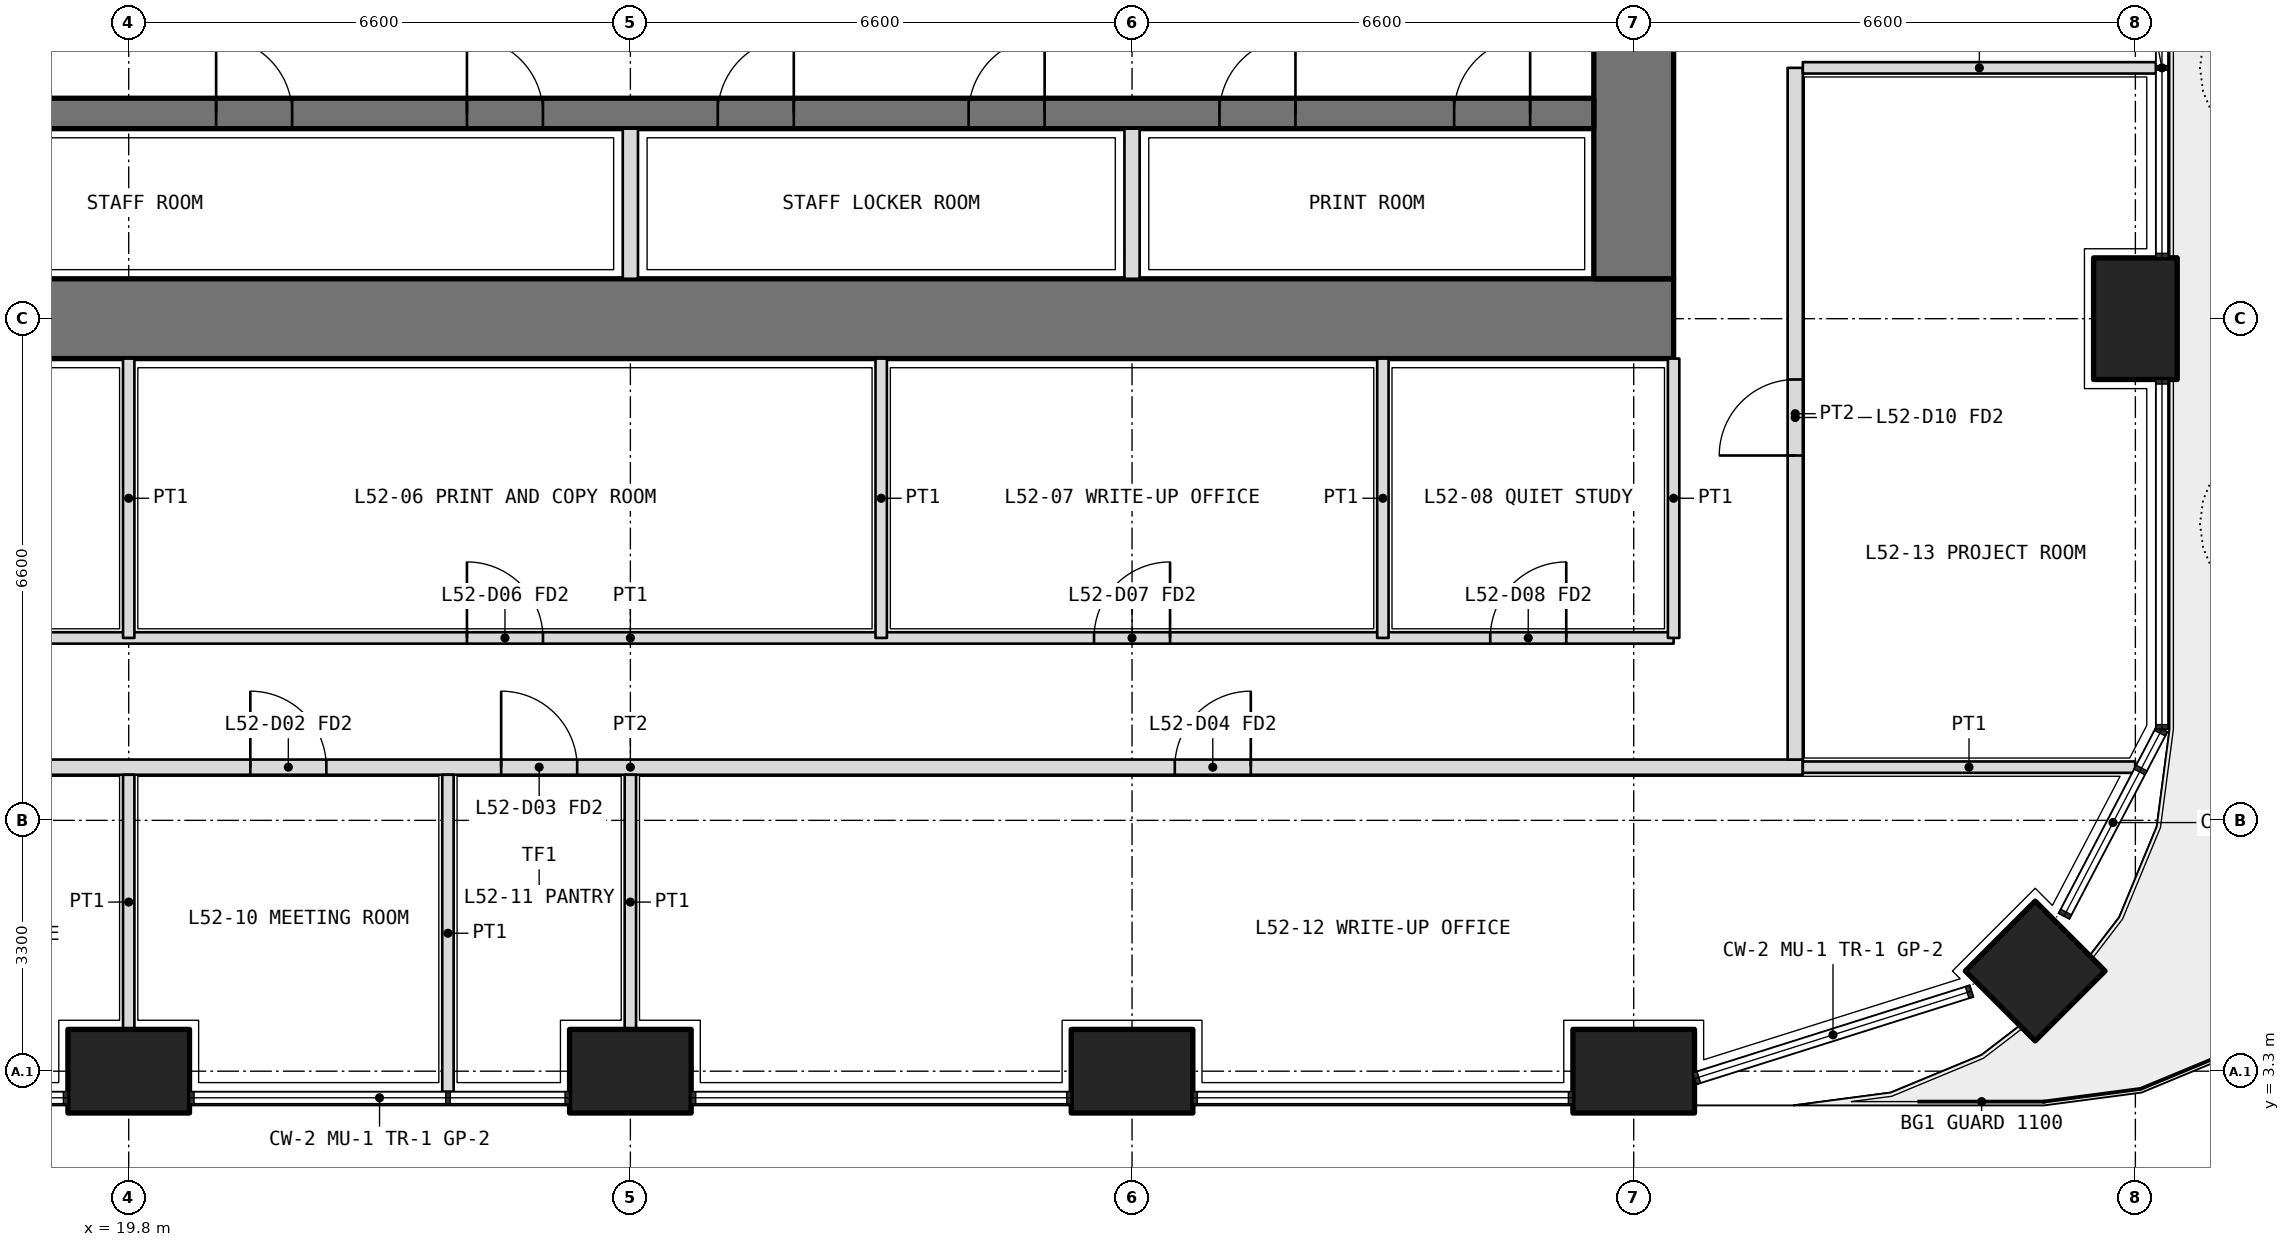
"""IFC4 building model, lengths in metres.
Left out: names, types, materials, properties, quantities, classifications, styles, units other than length and angle.
Written with IfcOpenShell. Run it as: python <this file> out.ifc"""

import sys

from ifc_helpers import new_model, si_unit, direction, frame, frame_2d, origin, origin_2d, place, context, subcontext, project, spatial, rectangle, extrude, element, fill, save


model = new_model("IFC4")
c1 = context("Model", 3, precision=1e-05, world=origin(), true_north=direction((0.0, 1.0)))
c2 = subcontext(c1, "Body", "Model", "MODEL_VIEW")
j1 = project(units=[si_unit("LENGTHUNIT", "METRE"), si_unit("PLANEANGLEUNIT", "RADIAN")], contexts=[c1])
p1 = place(None, origin())
s1 = spatial("IfcSite", under=j1, at=p1, CompositionType="ELEMENT")
p2 = place(p1, origin())
s2 = spatial("IfcBuilding", under=s1, at=p2, CompositionType="ELEMENT")
p3 = place(p2, frame((0.0, 0.0, 229.2)))
s3 = spatial("IfcBuildingStorey", under=s2, at=p3, CompositionType="ELEMENT", Elevation=229.2)
p4 = place(p3, frame((44.882, 4.618, 0.0), z_axis=(0.0, 0.0, 1.0), x_axis=(0.707106781187, 0.707106781187, 0.0)))
e1 = element("IfcColumn", 1, at=p4, inside=s3, PredefinedType="COLUMN", context=c2, shape_type="SweptSolid", body=[
    extrude(rectangle(XDim=1.3, YDim=1.3, at=origin_2d()), origin(), (0.0, 0.0, 1.0), 4.2),
])
for number, where, z_axis, x_axis in (
    (2, (19.8, 3.3, 0.0), (0.0, 0.0, 1.0), (1.0, 0.0, 0.0)),
    (3, (26.4, 3.3, 0.0), (0.0, 0.0, 1.0), (1.0, 0.0, 0.0)),
    (4, (33.0, 3.3, 0.0), (0.0, 0.0, 1.0), (1.0, 0.0, 0.0)),
    (5, (39.6, 3.3, 0.0), (0.0, 0.0, 1.0), (1.0, 0.0, 0.0)),
    (6, (46.2, 13.2, 0.0), (0.0, 0.0, 1.0), (0.0, 1.0, 0.0)),
):
    element("IfcColumn", number, at=place(p3, frame(where, z_axis=z_axis, x_axis=x_axis)), inside=s3, PredefinedType="COLUMN", context=c2, shape_type="SweptSolid", body=[
        extrude(rectangle(XDim=1.6, YDim=1.1, at=origin_2d()), origin(), (0.0, 0.0, 1.0), 4.2),
    ])
p5 = place(p3, frame((12.675, 13.2, 0.0), z_axis=(0.0, 0.0, 1.0), x_axis=(1.0, 0.0, 0.0)))
e7 = element("IfcWall", 7, at=p5, inside=s3, PredefinedType="SHEAR", context=c2, shape_type="SweptSolid", body=[
    extrude(rectangle(XDim=27.45, YDim=1.05, at=frame_2d((13.725, 0.0))), origin(), (0.0, 0.0, 1.0), 4.2),
])
p6 = place(p3, frame((39.6, 13.725, 0.0), z_axis=(0.0, 0.0, 1.0), x_axis=(0.0, 1.0, 0.0)))
e8 = element("IfcWall", 8, at=p6, inside=s3, PredefinedType="SHEAR", context=c2, shape_type="SweptSolid", body=[
    extrude(rectangle(XDim=18.75, YDim=1.05, at=frame_2d((9.375, 0.0))), origin(), (0.0, 0.0, 1.0), 4.2),
])
p7 = place(p6, frame((3.025, 0.0, 0.0)))
e9 = element("IfcOpeningElement", 9, at=p7, cuts=e8, PredefinedType="OPENING", context=c2, shape_type="SweptSolid", body=[
    extrude(rectangle(XDim=1.6, YDim=2.1, at=frame_2d((0.8, 1.05))), frame((0.0, 0.535, 0.0), z_axis=(0.0, -1.0, 0.0), x_axis=(1.0, 0.0, 0.0)), (0.0, 0.0, 1.0), 1.07),
])
p8 = place(p6, frame((13.825, 0.0, 0.0)))
e10 = element("IfcOpeningElement", 10, at=p8, cuts=e8, PredefinedType="OPENING", context=c2, shape_type="SweptSolid", body=[
    extrude(rectangle(XDim=1.6, YDim=2.1, at=frame_2d((0.8, 1.05))), frame((0.0, 0.535, 0.0), z_axis=(0.0, -1.0, 0.0), x_axis=(1.0, 0.0, 0.0)), (0.0, 0.0, 1.0), 1.07),
])
p9 = place(p3, frame((13.725, 15.9, 0.0), z_axis=(0.0, 0.0, 1.0), x_axis=(1.0, 0.0, 0.0)))
e11 = element("IfcWall", 11, at=p9, inside=s3, PredefinedType="SHEAR", context=c2, shape_type="SweptSolid", body=[
    extrude(rectangle(XDim=25.35, YDim=0.4, at=frame_2d((12.675, 0.0))), origin(), (0.0, 0.0, 1.0), 4.2),
])
p10 = place(p9, frame((0.837, 0.0, 0.0)))
e12 = element("IfcOpeningElement", 12, at=p10, cuts=e11, PredefinedType="OPENING", context=c2, shape_type="SweptSolid", body=[
    extrude(rectangle(XDim=1.0, YDim=2.1, at=frame_2d((0.5, 1.05))), frame((0.0, 0.21, 0.0), z_axis=(0.0, -1.0, 0.0), x_axis=(1.0, 0.0, 0.0)), (0.0, 0.0, 1.0), 0.42),
])
p11 = place(p9, frame((3.925, 0.0, 0.0)))
e13 = element("IfcOpeningElement", 13, at=p11, cuts=e11, PredefinedType="OPENING", context=c2, shape_type="SweptSolid", body=[
    extrude(rectangle(XDim=1.0, YDim=2.1, at=frame_2d((0.5, 1.05))), frame((0.0, 0.21, 0.0), z_axis=(0.0, -1.0, 0.0), x_axis=(1.0, 0.0, 0.0)), (0.0, 0.0, 1.0), 0.42),
])
p12 = place(p9, frame((7.225, 0.0, 0.0)))
e14 = element("IfcOpeningElement", 14, at=p12, cuts=e11, PredefinedType="OPENING", context=c2, shape_type="SweptSolid", body=[
    extrude(rectangle(XDim=1.0, YDim=2.1, at=frame_2d((0.5, 1.05))), frame((0.0, 0.21, 0.0), z_axis=(0.0, -1.0, 0.0), x_axis=(1.0, 0.0, 0.0)), (0.0, 0.0, 1.0), 0.42),
])
p13 = place(p9, frame((10.525, 0.0, 0.0)))
e15 = element("IfcOpeningElement", 15, at=p13, cuts=e11, PredefinedType="OPENING", context=c2, shape_type="SweptSolid", body=[
    extrude(rectangle(XDim=1.0, YDim=2.1, at=frame_2d((0.5, 1.05))), frame((0.0, 0.21, 0.0), z_axis=(0.0, -1.0, 0.0), x_axis=(1.0, 0.0, 0.0)), (0.0, 0.0, 1.0), 0.42),
])
p14 = place(p9, frame((13.825, 0.0, 0.0)))
e16 = element("IfcOpeningElement", 16, at=p14, cuts=e11, PredefinedType="OPENING", context=c2, shape_type="SweptSolid", body=[
    extrude(rectangle(XDim=1.0, YDim=2.1, at=frame_2d((0.5, 1.05))), frame((0.0, 0.21, 0.0), z_axis=(0.0, -1.0, 0.0), x_axis=(1.0, 0.0, 0.0)), (0.0, 0.0, 1.0), 0.42),
])
p15 = place(p9, frame((17.125, 0.0, 0.0)))
e17 = element("IfcOpeningElement", 17, at=p15, cuts=e11, PredefinedType="OPENING", context=c2, shape_type="SweptSolid", body=[
    extrude(rectangle(XDim=1.0, YDim=2.1, at=frame_2d((0.5, 1.05))), frame((0.0, 0.21, 0.0), z_axis=(0.0, -1.0, 0.0), x_axis=(1.0, 0.0, 0.0)), (0.0, 0.0, 1.0), 0.42),
])
p16 = place(p9, frame((20.425, 0.0, 0.0)))
e18 = element("IfcOpeningElement", 18, at=p16, cuts=e11, PredefinedType="OPENING", context=c2, shape_type="SweptSolid", body=[
    extrude(rectangle(XDim=1.0, YDim=2.1, at=frame_2d((0.5, 1.05))), frame((0.0, 0.21, 0.0), z_axis=(0.0, -1.0, 0.0), x_axis=(1.0, 0.0, 0.0)), (0.0, 0.0, 1.0), 0.42),
])
p17 = place(p9, frame((23.512, 0.0, 0.0)))
e19 = element("IfcOpeningElement", 19, at=p17, cuts=e11, PredefinedType="OPENING", context=c2, shape_type="SweptSolid", body=[
    extrude(rectangle(XDim=1.0, YDim=2.1, at=frame_2d((0.5, 1.05))), frame((0.0, 0.21, 0.0), z_axis=(0.0, -1.0, 0.0), x_axis=(1.0, 0.0, 0.0)), (0.0, 0.0, 1.0), 0.42),
])
for number, where, z_axis, x_axis in (
    (20, (26.4, 13.725, 0.0), (0.0, 0.0, 1.0), (0.0, 1.0, 0.0)),
    (21, (33.0, 13.725, 0.0), (0.0, 0.0, 1.0), (0.0, 1.0, 0.0)),
):
    element("IfcWall", number, at=place(p3, frame(where, z_axis=z_axis, x_axis=x_axis)), inside=s3, PredefinedType="PARTITIONING", context=c2, shape_type="SweptSolid", body=[
        extrude(rectangle(XDim=1.975, YDim=0.2, at=frame_2d((0.987, 0.0))), origin(), (0.0, 0.0, 1.0), 4.2),
    ])
p18 = place(p3, frame((12.675, 9.0, 0.0), z_axis=(0.0, 0.0, 1.0), x_axis=(1.0, 0.0, 0.0)))
e22 = element("IfcWall", 22, at=p18, inside=s3, PredefinedType="PARTITIONING", context=c2, shape_type="SweptSolid", body=[
    extrude(rectangle(XDim=27.45, YDim=0.15, at=frame_2d((13.725, 0.0))), origin(), (0.0, 0.0, 1.0), 3.0),
])
p19 = place(p18, frame((3.062, 0.0, 0.0)))
e23 = element("IfcOpeningElement", 23, at=p19, cuts=e22, PredefinedType="OPENING", context=c2, shape_type="SweptSolid", body=[
    extrude(rectangle(XDim=1.0, YDim=2.1, at=frame_2d((0.5, 1.05))), frame((0.0, 0.085, 0.0), z_axis=(0.0, -1.0, 0.0), x_axis=(1.0, 0.0, 0.0)), (0.0, 0.0, 1.0), 0.17),
])
p20 = place(p18, frame((11.575, 0.0, 0.0)))
e24 = element("IfcOpeningElement", 24, at=p20, cuts=e22, PredefinedType="OPENING", context=c2, shape_type="SweptSolid", body=[
    extrude(rectangle(XDim=1.0, YDim=2.1, at=frame_2d((0.5, 1.05))), frame((0.0, 0.085, 0.0), z_axis=(0.0, -1.0, 0.0), x_axis=(1.0, 0.0, 0.0)), (0.0, 0.0, 1.0), 0.17),
])
p21 = place(p18, frame((19.825, 0.0, 0.0)))
e25 = element("IfcOpeningElement", 25, at=p21, cuts=e22, PredefinedType="OPENING", context=c2, shape_type="SweptSolid", body=[
    extrude(rectangle(XDim=1.0, YDim=2.1, at=frame_2d((0.5, 1.05))), frame((0.0, 0.085, 0.0), z_axis=(0.0, -1.0, 0.0), x_axis=(1.0, 0.0, 0.0)), (0.0, 0.0, 1.0), 0.17),
])
p22 = place(p18, frame((25.038, 0.0, 0.0)))
e26 = element("IfcOpeningElement", 26, at=p22, cuts=e22, PredefinedType="OPENING", context=c2, shape_type="SweptSolid", body=[
    extrude(rectangle(XDim=1.0, YDim=2.1, at=frame_2d((0.5, 1.05))), frame((0.0, 0.085, 0.0), z_axis=(0.0, -1.0, 0.0), x_axis=(1.0, 0.0, 0.0)), (0.0, 0.0, 1.0), 0.17),
])
for number, where, z_axis, x_axis in (
    (27, (40.125, 12.675, 0.0), (0.0, 0.0, 1.0), (0.0, -1.0, 0.0)),
    (28, (19.8, 12.675, 0.0), (0.0, 0.0, 1.0), (0.0, -1.0, 0.0)),
):
    element("IfcWall", number, at=place(p3, frame(where, z_axis=z_axis, x_axis=x_axis)), inside=s3, PredefinedType="PARTITIONING", context=c2, shape_type="SweptSolid", body=[
        extrude(rectangle(XDim=3.675, YDim=0.15, at=frame_2d((1.837, 0.0))), origin(), (0.0, 0.0, 1.0), 3.0),
    ])
for number, where, z_axis, x_axis in (
    (29, (29.7, 12.675, 0.0), (0.0, 0.0, 1.0), (0.0, -1.0, 0.0)),
    (30, (36.3, 12.675, 0.0), (0.0, 0.0, 1.0), (0.0, -1.0, 0.0)),
):
    element("IfcWall", number, at=place(p3, frame(where, z_axis=z_axis, x_axis=x_axis)), inside=s3, PredefinedType="PARTITIONING", context=c2, shape_type="SweptSolid", body=[
        extrude(rectangle(XDim=3.675, YDim=0.15, at=frame_2d((1.837, 0.0))), origin(), (0.0, 0.0, 1.0), 3.9),
    ])
p23 = place(p3, frame((10.975, 7.3, 0.0), z_axis=(0.0, 0.0, 1.0), x_axis=(1.0, 0.0, 0.0)))
e31 = element("IfcWall", 31, at=p23, inside=s3, PredefinedType="PARTITIONING", context=c2, shape_type="SweptSolid", body=[
    extrude(rectangle(XDim=30.85, YDim=0.2, at=frame_2d((15.425, 0.0))), origin(), (0.0, 0.0, 1.0), 3.0),
])
p24 = place(p23, frame((3.962, 0.0, 0.0)))
e32 = element("IfcOpeningElement", 32, at=p24, cuts=e31, PredefinedType="OPENING", context=c2, shape_type="SweptSolid", body=[
    extrude(rectangle(XDim=1.0, YDim=2.1, at=frame_2d((0.5, 1.05))), frame((0.0, 0.11, 0.0), z_axis=(0.0, -1.0, 0.0), x_axis=(1.0, 0.0, 0.0)), (0.0, 0.0, 1.0), 0.22),
])
p25 = place(p23, frame((10.425, 0.0, 0.0)))
e33 = element("IfcOpeningElement", 33, at=p25, cuts=e31, PredefinedType="OPENING", context=c2, shape_type="SweptSolid", body=[
    extrude(rectangle(XDim=1.0, YDim=2.1, at=frame_2d((0.5, 1.05))), frame((0.0, 0.11, 0.0), z_axis=(0.0, -1.0, 0.0), x_axis=(1.0, 0.0, 0.0)), (0.0, 0.0, 1.0), 0.22),
])
p26 = place(p23, frame((13.725, 0.0, 0.0)))
e34 = element("IfcOpeningElement", 34, at=p26, cuts=e31, PredefinedType="OPENING", context=c2, shape_type="SweptSolid", body=[
    extrude(rectangle(XDim=1.0, YDim=2.1, at=frame_2d((0.5, 1.05))), frame((0.0, 0.11, 0.0), z_axis=(0.0, -1.0, 0.0), x_axis=(1.0, 0.0, 0.0)), (0.0, 0.0, 1.0), 0.22),
])
p27 = place(p23, frame((22.587, 0.0, 0.0)))
e35 = element("IfcOpeningElement", 35, at=p27, cuts=e31, PredefinedType="OPENING", context=c2, shape_type="SweptSolid", body=[
    extrude(rectangle(XDim=1.0, YDim=2.1, at=frame_2d((0.5, 1.05))), frame((0.0, 0.11, 0.0), z_axis=(0.0, -1.0, 0.0), x_axis=(1.0, 0.0, 0.0)), (0.0, 0.0, 1.0), 0.22),
])
p28 = place(p3, frame((41.725, 7.4, 0.0), z_axis=(0.0, 0.0, 1.0), x_axis=(0.0, 1.0, 0.0)))
e36 = element("IfcWall", 36, at=p28, inside=s3, PredefinedType="PARTITIONING", context=c2, shape_type="SweptSolid", body=[
    extrude(rectangle(XDim=9.1, YDim=0.2, at=frame_2d((4.55, 0.0))), origin(), (0.0, 0.0, 1.0), 3.0),
])
p29 = place(p28, frame((4.0, 0.0, 0.0)))
e37 = element("IfcOpeningElement", 37, at=p29, cuts=e36, PredefinedType="OPENING", context=c2, shape_type="SweptSolid", body=[
    extrude(rectangle(XDim=1.0, YDim=2.1, at=frame_2d((0.5, 1.05))), frame((0.0, 0.11, 0.0), z_axis=(0.0, -1.0, 0.0), x_axis=(1.0, 0.0, 0.0)), (0.0, 0.0, 1.0), 0.22),
])
p30 = place(p3, frame((46.198, 7.3, 0.0), z_axis=(0.0, 0.0, 1.0), x_axis=(-1.0, 0.0, 0.0)))
e38 = element("IfcWall", 38, at=p30, inside=s3, PredefinedType="PARTITIONING", context=c2, shape_type="SweptSolid", body=[
    extrude(rectangle(XDim=4.373, YDim=0.15, at=frame_2d((2.186, 0.0))), origin(), (0.0, 0.0, 1.0), 2.7),
])
p31 = place(p3, frame((24.0, 3.03, 0.0), z_axis=(0.0, 0.0, 1.0), x_axis=(0.0, 1.0, 0.0)))
e39 = element("IfcWall", 39, at=p31, inside=s3, PredefinedType="PARTITIONING", context=c2, shape_type="SweptSolid", body=[
    extrude(rectangle(XDim=4.17, YDim=0.15, at=frame_2d((2.085, 0.0))), origin(), (0.0, 0.0, 1.0), 2.7),
])
for number, where, z_axis, x_axis in (
    (40, (26.4, 3.85, 0.0), (0.0, 0.0, 1.0), (0.0, 1.0, 0.0)),
    (41, (19.8, 3.85, 0.0), (0.0, 0.0, 1.0), (0.0, 1.0, 0.0)),
):
    element("IfcWall", number, at=place(p3, frame(where, z_axis=z_axis, x_axis=x_axis)), inside=s3, PredefinedType="PARTITIONING", context=c2, shape_type="SweptSolid", body=[
        extrude(rectangle(XDim=3.35, YDim=0.15, at=frame_2d((1.675, 0.0))), origin(), (0.0, 0.0, 1.0), 3.0),
    ])
p32 = place(p3, frame((46.47, 16.5, 0.0), z_axis=(0.0, 0.0, 1.0), x_axis=(-1.0, 0.0, 0.0)))
e42 = element("IfcWall", 42, at=p32, inside=s3, PredefinedType="PARTITIONING", context=c2, shape_type="SweptSolid", body=[
    extrude(rectangle(XDim=4.645, YDim=0.15, at=frame_2d((2.323, 0.0))), origin(), (0.0, 0.0, 1.0), 2.7),
])
p33 = place(p20, origin())
e43 = element("IfcDoor", 43, at=p33, inside=s3, OperationType="SINGLE_SWING_LEFT", PredefinedType="DOOR", context=c2, shape_type="SweptSolid", body=[
    extrude(rectangle(XDim=1.0, YDim=2.1, at=frame_2d((0.5, 1.05))), frame((0.0, 0.025, 0.0), z_axis=(0.0, -1.0, 0.0), x_axis=(1.0, 0.0, 0.0)), (0.0, 0.0, 1.0), 0.05),
])
fill(e24, e43)
p34 = place(p21, origin())
e44 = element("IfcDoor", 44, at=p34, inside=s3, OperationType="SINGLE_SWING_RIGHT", PredefinedType="DOOR", context=c2, shape_type="SweptSolid", body=[
    extrude(rectangle(XDim=1.0, YDim=2.1, at=frame_2d((0.5, 1.05))), frame((0.0, 0.025, 0.0), z_axis=(0.0, -1.0, 0.0), x_axis=(1.0, 0.0, 0.0)), (0.0, 0.0, 1.0), 0.05),
])
fill(e25, e44)
p35 = place(p22, origin())
e45 = element("IfcDoor", 45, at=p35, inside=s3, OperationType="SINGLE_SWING_RIGHT", PredefinedType="DOOR", context=c2, shape_type="SweptSolid", body=[
    extrude(rectangle(XDim=1.0, YDim=2.1, at=frame_2d((0.5, 1.05))), frame((0.0, 0.025, 0.0), z_axis=(0.0, -1.0, 0.0), x_axis=(1.0, 0.0, 0.0)), (0.0, 0.0, 1.0), 0.05),
])
fill(e26, e45)
p36 = place(p25, origin())
e46 = element("IfcDoor", 46, at=p36, inside=s3, OperationType="SINGLE_SWING_LEFT", PredefinedType="DOOR", context=c2, shape_type="SweptSolid", body=[
    extrude(rectangle(XDim=1.0, YDim=2.1, at=frame_2d((0.5, 1.05))), frame((0.0, 0.025, 0.0), z_axis=(0.0, -1.0, 0.0), x_axis=(1.0, 0.0, 0.0)), (0.0, 0.0, 1.0), 0.05),
])
fill(e33, e46)
p37 = place(p26, origin())
e47 = element("IfcDoor", 47, at=p37, inside=s3, OperationType="SINGLE_SWING_LEFT", PredefinedType="DOOR", context=c2, shape_type="SweptSolid", body=[
    extrude(rectangle(XDim=1.0, YDim=2.1, at=frame_2d((0.5, 1.05))), frame((0.0, 0.025, 0.0), z_axis=(0.0, -1.0, 0.0), x_axis=(1.0, 0.0, 0.0)), (0.0, 0.0, 1.0), 0.05),
])
fill(e34, e47)
p38 = place(p27, origin())
e48 = element("IfcDoor", 48, at=p38, inside=s3, OperationType="SINGLE_SWING_RIGHT", PredefinedType="DOOR", context=c2, shape_type="SweptSolid", body=[
    extrude(rectangle(XDim=1.0, YDim=2.1, at=frame_2d((0.5, 1.05))), frame((0.0, 0.025, 0.0), z_axis=(0.0, -1.0, 0.0), x_axis=(1.0, 0.0, 0.0)), (0.0, 0.0, 1.0), 0.05),
])
fill(e35, e48)
p39 = place(p29, origin())
e49 = element("IfcDoor", 49, at=p39, inside=s3, OperationType="SINGLE_SWING_LEFT", PredefinedType="DOOR", context=c2, shape_type="SweptSolid", body=[
    extrude(rectangle(XDim=1.0, YDim=2.1, at=frame_2d((0.5, 1.05))), frame((0.0, 0.025, 0.0), z_axis=(0.0, -1.0, 0.0), x_axis=(1.0, 0.0, 0.0)), (0.0, 0.0, 1.0), 0.05),
])
fill(e37, e49)
p40 = place(p12, origin())
e50 = element("IfcDoor", 50, at=p40, inside=s3, OperationType="SINGLE_SWING_LEFT", PredefinedType="DOOR", context=c2, shape_type="SweptSolid", body=[
    extrude(rectangle(XDim=1.0, YDim=2.1, at=frame_2d((0.5, 1.05))), frame((0.0, 0.025, 0.0), z_axis=(0.0, -1.0, 0.0), x_axis=(1.0, 0.0, 0.0)), (0.0, 0.0, 1.0), 0.05),
])
fill(e14, e50)
p41 = place(p13, origin())
e51 = element("IfcDoor", 51, at=p41, inside=s3, OperationType="SINGLE_SWING_LEFT", PredefinedType="DOOR", context=c2, shape_type="SweptSolid", body=[
    extrude(rectangle(XDim=1.0, YDim=2.1, at=frame_2d((0.5, 1.05))), frame((0.0, 0.025, 0.0), z_axis=(0.0, -1.0, 0.0), x_axis=(1.0, 0.0, 0.0)), (0.0, 0.0, 1.0), 0.05),
])
fill(e15, e51)
p42 = place(p14, origin())
e52 = element("IfcDoor", 52, at=p42, inside=s3, OperationType="SINGLE_SWING_RIGHT", PredefinedType="DOOR", context=c2, shape_type="SweptSolid", body=[
    extrude(rectangle(XDim=1.0, YDim=2.1, at=frame_2d((0.5, 1.05))), frame((0.0, 0.025, 0.0), z_axis=(0.0, -1.0, 0.0), x_axis=(1.0, 0.0, 0.0)), (0.0, 0.0, 1.0), 0.05),
])
fill(e16, e52)
p43 = place(p15, origin())
e53 = element("IfcDoor", 53, at=p43, inside=s3, OperationType="SINGLE_SWING_RIGHT", PredefinedType="DOOR", context=c2, shape_type="SweptSolid", body=[
    extrude(rectangle(XDim=1.0, YDim=2.1, at=frame_2d((0.5, 1.05))), frame((0.0, 0.025, 0.0), z_axis=(0.0, -1.0, 0.0), x_axis=(1.0, 0.0, 0.0)), (0.0, 0.0, 1.0), 0.05),
])
fill(e17, e53)
p44 = place(p16, origin())
e54 = element("IfcDoor", 54, at=p44, inside=s3, OperationType="SINGLE_SWING_RIGHT", PredefinedType="DOOR", context=c2, shape_type="SweptSolid", body=[
    extrude(rectangle(XDim=1.0, YDim=2.1, at=frame_2d((0.5, 1.05))), frame((0.0, 0.025, 0.0), z_axis=(0.0, -1.0, 0.0), x_axis=(1.0, 0.0, 0.0)), (0.0, 0.0, 1.0), 0.05),
])
fill(e18, e54)
p45 = place(p17, origin())
e55 = element("IfcDoor", 55, at=p45, inside=s3, OperationType="SINGLE_SWING_RIGHT", PredefinedType="DOOR", context=c2, shape_type="SweptSolid", body=[
    extrude(rectangle(XDim=1.0, YDim=2.1, at=frame_2d((0.5, 1.05))), frame((0.0, 0.025, 0.0), z_axis=(0.0, -1.0, 0.0), x_axis=(1.0, 0.0, 0.0)), (0.0, 0.0, 1.0), 0.05),
])
fill(e19, e55)
save(model, sys.argv[1])
